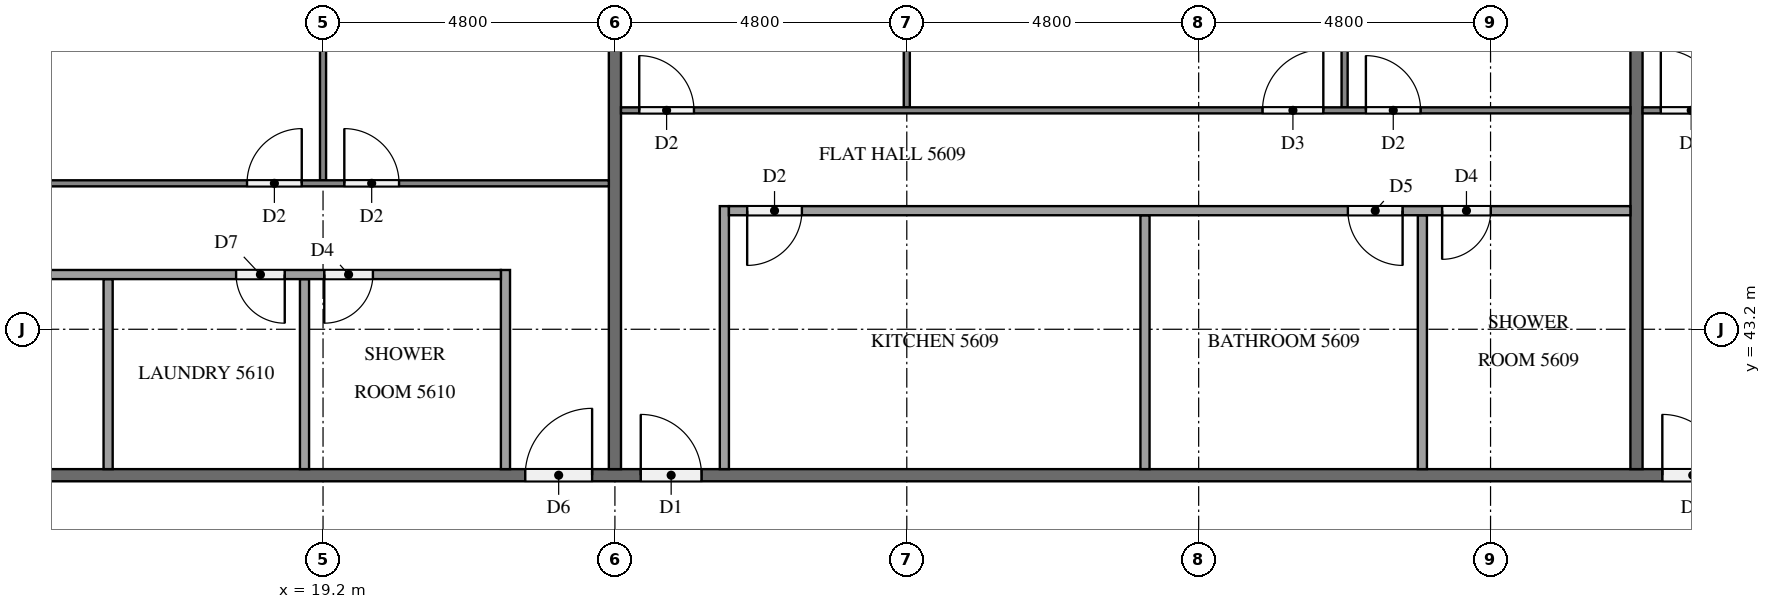
"""IFC4 building model, lengths in metres.
Left out: names, types, materials, properties, quantities, classifications, styles, units other than length and angle.
Written with IfcOpenShell. Run it as: python <this file> out.ifc"""

import sys

from ifc_helpers import new_model, si_unit, direction, frame, frame_2d, origin, place, context, subcontext, project, spatial, rectangle, extrude, element, fill, save


model = new_model("IFC4")
c1 = context("Model", 3, precision=1e-05, world=origin(), true_north=direction((0.0, 1.0)))
c2 = subcontext(c1, "Body", "Model", "MODEL_VIEW")
j1 = project(units=[si_unit("LENGTHUNIT", "METRE"), si_unit("PLANEANGLEUNIT", "RADIAN")], contexts=[c1])
p1 = place(None, origin())
s1 = spatial("IfcSite", under=j1, at=p1, CompositionType="ELEMENT")
p2 = place(p1, origin())
s2 = spatial("IfcBuilding", under=s1, at=p2, CompositionType="ELEMENT")
p3 = place(p2, frame((0.0, 0.0, 215.8)))
s3 = spatial("IfcBuildingStorey", under=s2, at=p3, CompositionType="ELEMENT", Elevation=215.8)
p4 = place(p3, frame((11.9, 40.8, 0.0), z_axis=(0.0, 0.0, 1.0), x_axis=(1.0, 0.0, 0.0)))
e1 = element("IfcWall", 1, at=p4, inside=s3, PredefinedType="PARTITIONING", context=c2, shape_type="SweptSolid", body=[
    extrude(rectangle(XDim=38.6, YDim=0.2, at=frame_2d((19.3, 0.0))), origin(), (0.0, 0.0, 1.0), 3.2),
])
p5 = place(p4, frame((36.525, 0.0, 0.0)))
e2 = element("IfcOpeningElement", 2, at=p5, cuts=e1, PredefinedType="OPENING", context=c2, shape_type="SweptSolid", body=[
    extrude(rectangle(XDim=1.0, YDim=2.1, at=frame_2d((0.5, 1.05))), frame((0.0, 0.11, 0.0), z_axis=(0.0, -1.0, 0.0), x_axis=(1.0, 0.0, 0.0)), (0.0, 0.0, 1.0), 0.22),
])
p6 = place(p4, frame((29.325, 0.0, 0.0)))
e3 = element("IfcOpeningElement", 3, at=p6, cuts=e1, PredefinedType="OPENING", context=c2, shape_type="SweptSolid", body=[
    extrude(rectangle(XDim=1.0, YDim=2.1, at=frame_2d((0.5, 1.05))), frame((0.0, 0.11, 0.0), z_axis=(0.0, -1.0, 0.0), x_axis=(1.0, 0.0, 0.0)), (0.0, 0.0, 1.0), 0.22),
])
p7 = place(p4, frame((12.525, 0.0, 0.0)))
e4 = element("IfcOpeningElement", 4, at=p7, cuts=e1, PredefinedType="OPENING", context=c2, shape_type="SweptSolid", body=[
    extrude(rectangle(XDim=1.0, YDim=2.1, at=frame_2d((0.5, 1.05))), frame((0.0, 0.11, 0.0), z_axis=(0.0, -1.0, 0.0), x_axis=(1.0, 0.0, 0.0)), (0.0, 0.0, 1.0), 0.22),
])
p8 = place(p4, frame((10.625, 0.0, 0.0)))
e5 = element("IfcOpeningElement", 5, at=p8, cuts=e1, PredefinedType="OPENING", context=c2, shape_type="SweptSolid", body=[
    extrude(rectangle(XDim=1.1, YDim=2.1, at=frame_2d((0.55, 1.05))), frame((0.0, 0.11, 0.0), z_axis=(0.0, -1.0, 0.0), x_axis=(1.0, 0.0, 0.0)), (0.0, 0.0, 1.0), 0.22),
])
for number, where, z_axis, x_axis in (
    (6, (40.8, 52.7, 0.0), (0.0, 0.0, 1.0), (0.0, -1.0, 0.0)),
    (7, (24.0, 52.7, 0.0), (0.0, 0.0, 1.0), (0.0, -1.0, 0.0)),
):
    element("IfcWall", number, at=place(p3, frame(where, z_axis=z_axis, x_axis=x_axis)), inside=s3, PredefinedType="PARTITIONING", context=c2, shape_type="SweptSolid", body=[
        extrude(rectangle(XDim=11.8, YDim=0.2, at=frame_2d((5.9, 0.0))), origin(), (0.0, 0.0, 1.0), 3.2),
    ])
p9 = place(p3, frame((40.9, 46.8, 0.0), z_axis=(0.0, 0.0, 1.0), x_axis=(1.0, 0.0, 0.0)))
e8 = element("IfcWall", 8, at=p9, inside=s3, PredefinedType="PARTITIONING", context=c2, shape_type="SweptSolid", body=[
    extrude(rectangle(XDim=7.0, YDim=0.1, at=frame_2d((3.5, 0.0))), origin(), (0.0, 0.0, 1.0), 3.2),
])
p10 = place(p9, frame((0.3, 0.0, 0.0)))
e9 = element("IfcOpeningElement", 9, at=p10, cuts=e8, PredefinedType="OPENING", context=c2, shape_type="SweptSolid", body=[
    extrude(rectangle(XDim=1.0, YDim=2.1, at=frame_2d((0.5, 1.05))), frame((0.0, 0.06, 0.0), z_axis=(0.0, -1.0, 0.0), x_axis=(1.0, 0.0, 0.0)), (0.0, 0.0, 1.0), 0.12),
])
p11 = place(p3, frame((28.8, 46.85, 0.0), z_axis=(0.0, 0.0, 1.0), x_axis=(0.0, 1.0, 0.0)))
e10 = element("IfcWall", 10, at=p11, inside=s3, PredefinedType="PARTITIONING", context=c2, shape_type="SweptSolid", body=[
    extrude(rectangle(XDim=5.625, YDim=0.1, at=frame_2d((2.812, 0.0))), origin(), (0.0, 0.0, 1.0), 3.2),
])
p12 = place(p3, frame((36.0, 46.85, 0.0), z_axis=(0.0, 0.0, 1.0), x_axis=(0.0, 1.0, 0.0)))
e11 = element("IfcWall", 11, at=p12, inside=s3, PredefinedType="PARTITIONING", context=c2, shape_type="SweptSolid", body=[
    extrude(rectangle(XDim=5.85, YDim=0.1, at=frame_2d((2.925, 0.0))), origin(), (0.0, 0.0, 1.0), 3.2),
])
p13 = place(p3, frame((24.1, 46.8, 0.0), z_axis=(0.0, 0.0, 1.0), x_axis=(1.0, 0.0, 0.0)))
e12 = element("IfcWall", 12, at=p13, inside=s3, PredefinedType="PARTITIONING", context=c2, shape_type="SweptSolid", body=[
    extrude(rectangle(XDim=16.6, YDim=0.1, at=frame_2d((8.3, 0.0))), origin(), (0.0, 0.0, 1.0), 3.2),
])
p14 = place(p13, frame((0.3, 0.0, 0.0)))
e13 = element("IfcOpeningElement", 13, at=p14, cuts=e12, PredefinedType="OPENING", context=c2, shape_type="SweptSolid", body=[
    extrude(rectangle(XDim=0.9, YDim=2.1, at=frame_2d((0.45, 1.05))), frame((0.0, 0.06, 0.0), z_axis=(0.0, -1.0, 0.0), x_axis=(1.0, 0.0, 0.0)), (0.0, 0.0, 1.0), 0.12),
])
p15 = place(p13, frame((10.55, 0.0, 0.0)))
e14 = element("IfcOpeningElement", 14, at=p15, cuts=e12, PredefinedType="OPENING", context=c2, shape_type="SweptSolid", body=[
    extrude(rectangle(XDim=1.0, YDim=2.1, at=frame_2d((0.5, 1.05))), frame((0.0, 0.06, 0.0), z_axis=(0.0, -1.0, 0.0), x_axis=(1.0, 0.0, 0.0)), (0.0, 0.0, 1.0), 0.12),
])
p16 = place(p13, frame((12.25, 0.0, 0.0)))
e15 = element("IfcOpeningElement", 15, at=p16, cuts=e12, PredefinedType="OPENING", context=c2, shape_type="SweptSolid", body=[
    extrude(rectangle(XDim=0.9, YDim=2.1, at=frame_2d((0.45, 1.05))), frame((0.0, 0.06, 0.0), z_axis=(0.0, -1.0, 0.0), x_axis=(1.0, 0.0, 0.0)), (0.0, 0.0, 1.0), 0.12),
])
for number, where, z_axis, x_axis in (
    (16, (32.717, 40.9, 0.0), (0.0, 0.0, 1.0), (0.0, 1.0, 0.0)),
    (17, (37.279, 40.9, 0.0), (0.0, 0.0, 1.0), (0.0, 1.0, 0.0)),
):
    element("IfcWall", number, at=place(p3, frame(where, z_axis=z_axis, x_axis=x_axis)), inside=s3, PredefinedType="PARTITIONING", context=c2, shape_type="SweptSolid", body=[
        extrude(rectangle(XDim=4.175, YDim=0.15, at=frame_2d((2.087, 0.0))), origin(), (0.0, 0.0, 1.0), 3.2),
    ])
p17 = place(p3, frame((25.8, 40.9, 0.0), z_axis=(0.0, 0.0, 1.0), x_axis=(0.0, 1.0, 0.0)))
e18 = element("IfcWall", 18, at=p17, inside=s3, PredefinedType="PARTITIONING", context=c2, shape_type="SweptSolid", body=[
    extrude(rectangle(XDim=4.325, YDim=0.15, at=frame_2d((2.163, 0.0))), origin(), (0.0, 0.0, 1.0), 3.2),
])
p18 = place(p3, frame((40.7, 45.15, 0.0), z_axis=(0.0, 0.0, 1.0), x_axis=(-1.0, 0.0, 0.0)))
e19 = element("IfcWall", 19, at=p18, inside=s3, PredefinedType="PARTITIONING", context=c2, shape_type="SweptSolid", body=[
    extrude(rectangle(XDim=14.825, YDim=0.15, at=frame_2d((7.413, 0.0))), origin(), (0.0, 0.0, 1.0), 3.2),
])
p19 = place(p18, frame((13.625, 0.0, 0.0)))
e20 = element("IfcOpeningElement", 20, at=p19, cuts=e19, PredefinedType="OPENING", context=c2, shape_type="SweptSolid", body=[
    extrude(rectangle(XDim=0.9, YDim=2.1, at=frame_2d((0.45, 1.05))), frame((0.0, 0.085, 0.0), z_axis=(0.0, -1.0, 0.0), x_axis=(1.0, 0.0, 0.0)), (0.0, 0.0, 1.0), 0.17),
])
p20 = place(p18, frame((3.746, 0.0, 0.0)))
e21 = element("IfcOpeningElement", 21, at=p20, cuts=e19, PredefinedType="OPENING", context=c2, shape_type="SweptSolid", body=[
    extrude(rectangle(XDim=0.9, YDim=2.1, at=frame_2d((0.45, 1.05))), frame((0.0, 0.085, 0.0), z_axis=(0.0, -1.0, 0.0), x_axis=(1.0, 0.0, 0.0)), (0.0, 0.0, 1.0), 0.17),
])
p21 = place(p18, frame((2.296, 0.0, 0.0)))
e22 = element("IfcOpeningElement", 22, at=p21, cuts=e19, PredefinedType="OPENING", context=c2, shape_type="SweptSolid", body=[
    extrude(rectangle(XDim=0.8, YDim=2.1, at=frame_2d((0.4, 1.05))), frame((0.0, 0.085, 0.0), z_axis=(0.0, -1.0, 0.0), x_axis=(1.0, 0.0, 0.0)), (0.0, 0.0, 1.0), 0.17),
])
p22 = place(p3, frame((19.2, 45.65, 0.0), z_axis=(0.0, 0.0, 1.0), x_axis=(0.0, 1.0, 0.0)))
e23 = element("IfcWall", 23, at=p22, inside=s3, PredefinedType="PARTITIONING", context=c2, shape_type="SweptSolid", body=[
    extrude(rectangle(XDim=6.825, YDim=0.1, at=frame_2d((3.413, 0.0))), origin(), (0.0, 0.0, 1.0), 3.2),
])
p23 = place(p3, frame((4.9, 45.6, 0.0), z_axis=(0.0, 0.0, 1.0), x_axis=(1.0, 0.0, 0.0)))
e24 = element("IfcWall", 24, at=p23, inside=s3, PredefinedType="PARTITIONING", context=c2, shape_type="SweptSolid", body=[
    extrude(rectangle(XDim=19.0, YDim=0.1, at=frame_2d((9.5, 0.0))), origin(), (0.0, 0.0, 1.0), 3.2),
])
p24 = place(p23, frame((14.65, 0.0, 0.0)))
e25 = element("IfcOpeningElement", 25, at=p24, cuts=e24, PredefinedType="OPENING", context=c2, shape_type="SweptSolid", body=[
    extrude(rectangle(XDim=0.9, YDim=2.1, at=frame_2d((0.45, 1.05))), frame((0.0, 0.06, 0.0), z_axis=(0.0, -1.0, 0.0), x_axis=(1.0, 0.0, 0.0)), (0.0, 0.0, 1.0), 0.12),
])
p25 = place(p23, frame((13.05, 0.0, 0.0)))
e26 = element("IfcOpeningElement", 26, at=p25, cuts=e24, PredefinedType="OPENING", context=c2, shape_type="SweptSolid", body=[
    extrude(rectangle(XDim=0.9, YDim=2.1, at=frame_2d((0.45, 1.05))), frame((0.0, 0.06, 0.0), z_axis=(0.0, -1.0, 0.0), x_axis=(1.0, 0.0, 0.0)), (0.0, 0.0, 1.0), 0.12),
])
p26 = place(p23, frame((5.05, 0.0, 0.0)))
e27 = element("IfcOpeningElement", 27, at=p26, cuts=e24, PredefinedType="OPENING", context=c2, shape_type="SweptSolid", body=[
    extrude(rectangle(XDim=0.9, YDim=2.1, at=frame_2d((0.45, 1.05))), frame((0.0, 0.06, 0.0), z_axis=(0.0, -1.0, 0.0), x_axis=(1.0, 0.0, 0.0)), (0.0, 0.0, 1.0), 0.12),
])
p27 = place(p23, frame((3.35, 0.0, 0.0)))
e28 = element("IfcOpeningElement", 28, at=p27, cuts=e24, PredefinedType="OPENING", context=c2, shape_type="SweptSolid", body=[
    extrude(rectangle(XDim=1.0, YDim=2.1, at=frame_2d((0.5, 1.05))), frame((0.0, 0.06, 0.0), z_axis=(0.0, -1.0, 0.0), x_axis=(1.0, 0.0, 0.0)), (0.0, 0.0, 1.0), 0.12),
])
for number, where, z_axis, x_axis in (
    (29, (18.895, 40.9, 0.0), (0.0, 0.0, 1.0), (0.0, 1.0, 0.0)),
    (30, (15.666, 40.9, 0.0), (0.0, 0.0, 1.0), (0.0, 1.0, 0.0)),
):
    element("IfcWall", number, at=place(p3, frame(where, z_axis=z_axis, x_axis=x_axis)), inside=s3, PredefinedType="PARTITIONING", context=c2, shape_type="SweptSolid", body=[
        extrude(rectangle(XDim=3.125, YDim=0.15, at=frame_2d((1.562, 0.0))), origin(), (0.0, 0.0, 1.0), 3.2),
    ])
p28 = place(p3, frame((22.2, 40.9, 0.0), z_axis=(0.0, 0.0, 1.0), x_axis=(0.0, 1.0, 0.0)))
e31 = element("IfcWall", 31, at=p28, inside=s3, PredefinedType="PARTITIONING", context=c2, shape_type="SweptSolid", body=[
    extrude(rectangle(XDim=3.275, YDim=0.15, at=frame_2d((1.638, 0.0))), origin(), (0.0, 0.0, 1.0), 3.2),
])
p29 = place(p3, frame((22.125, 44.1, 0.0), z_axis=(0.0, 0.0, 1.0), x_axis=(-1.0, 0.0, 0.0)))
e32 = element("IfcWall", 32, at=p29, inside=s3, PredefinedType="PARTITIONING", context=c2, shape_type="SweptSolid", body=[
    extrude(rectangle(XDim=17.225, YDim=0.15, at=frame_2d((8.613, 0.0))), origin(), (0.0, 0.0, 1.0), 3.2),
])
p30 = place(p29, frame((2.105, 0.0, 0.0)))
e33 = element("IfcOpeningElement", 33, at=p30, cuts=e32, PredefinedType="OPENING", context=c2, shape_type="SweptSolid", body=[
    extrude(rectangle(XDim=0.8, YDim=2.1, at=frame_2d((0.4, 1.05))), frame((0.0, 0.085, 0.0), z_axis=(0.0, -1.0, 0.0), x_axis=(1.0, 0.0, 0.0)), (0.0, 0.0, 1.0), 0.17),
])
p31 = place(p29, frame((3.555, 0.0, 0.0)))
e34 = element("IfcOpeningElement", 34, at=p31, cuts=e32, PredefinedType="OPENING", context=c2, shape_type="SweptSolid", body=[
    extrude(rectangle(XDim=0.8, YDim=2.1, at=frame_2d((0.4, 1.05))), frame((0.0, 0.085, 0.0), z_axis=(0.0, -1.0, 0.0), x_axis=(1.0, 0.0, 0.0)), (0.0, 0.0, 1.0), 0.17),
])
p32 = place(p29, frame((11.694, 0.0, 0.0)))
e35 = element("IfcOpeningElement", 35, at=p32, cuts=e32, PredefinedType="OPENING", context=c2, shape_type="SweptSolid", body=[
    extrude(rectangle(XDim=0.9, YDim=2.1, at=frame_2d((0.45, 1.05))), frame((0.0, 0.085, 0.0), z_axis=(0.0, -1.0, 0.0), x_axis=(1.0, 0.0, 0.0)), (0.0, 0.0, 1.0), 0.17),
])
p33 = place(p29, frame((13.244, 0.0, 0.0)))
e36 = element("IfcOpeningElement", 36, at=p33, cuts=e32, PredefinedType="OPENING", context=c2, shape_type="SweptSolid", body=[
    extrude(rectangle(XDim=0.9, YDim=2.1, at=frame_2d((0.45, 1.05))), frame((0.0, 0.085, 0.0), z_axis=(0.0, -1.0, 0.0), x_axis=(1.0, 0.0, 0.0)), (0.0, 0.0, 1.0), 0.17),
])
p34 = place(p6, origin())
e37 = element("IfcDoor", 37, at=p34, inside=s3, OperationType="SINGLE_SWING_LEFT", PredefinedType="DOOR", context=c2, shape_type="SweptSolid", body=[
    extrude(rectangle(XDim=1.0, YDim=2.1, at=frame_2d((0.5, 1.05))), frame((0.0, 0.025, 0.0), z_axis=(0.0, -1.0, 0.0), x_axis=(1.0, 0.0, 0.0)), (0.0, 0.0, 1.0), 0.05),
])
fill(e3, e37)
p35 = place(p7, origin())
e38 = element("IfcDoor", 38, at=p35, inside=s3, OperationType="SINGLE_SWING_LEFT", PredefinedType="DOOR", context=c2, shape_type="SweptSolid", body=[
    extrude(rectangle(XDim=1.0, YDim=2.1, at=frame_2d((0.5, 1.05))), frame((0.0, 0.025, 0.0), z_axis=(0.0, -1.0, 0.0), x_axis=(1.0, 0.0, 0.0)), (0.0, 0.0, 1.0), 0.05),
])
fill(e4, e38)
p36 = place(p8, origin())
e39 = element("IfcDoor", 39, at=p36, inside=s3, OperationType="SINGLE_SWING_RIGHT", PredefinedType="DOOR", context=c2, shape_type="SweptSolid", body=[
    extrude(rectangle(XDim=1.1, YDim=2.1, at=frame_2d((0.55, 1.05))), frame((0.0, 0.025, 0.0), z_axis=(0.0, -1.0, 0.0), x_axis=(1.0, 0.0, 0.0)), (0.0, 0.0, 1.0), 0.05),
])
fill(e5, e39)
p37 = place(p10, origin())
e40 = element("IfcDoor", 40, at=p37, inside=s3, OperationType="SINGLE_SWING_LEFT", PredefinedType="DOOR", context=c2, shape_type="SweptSolid", body=[
    extrude(rectangle(XDim=1.0, YDim=2.1, at=frame_2d((0.5, 1.05))), frame((0.0, 0.025, 0.0), z_axis=(0.0, -1.0, 0.0), x_axis=(1.0, 0.0, 0.0)), (0.0, 0.0, 1.0), 0.05),
])
fill(e9, e40)
p38 = place(p14, origin())
e41 = element("IfcDoor", 41, at=p38, inside=s3, OperationType="SINGLE_SWING_LEFT", PredefinedType="DOOR", context=c2, shape_type="SweptSolid", body=[
    extrude(rectangle(XDim=0.9, YDim=2.1, at=frame_2d((0.45, 1.05))), frame((0.0, 0.025, 0.0), z_axis=(0.0, -1.0, 0.0), x_axis=(1.0, 0.0, 0.0)), (0.0, 0.0, 1.0), 0.05),
])
fill(e13, e41)
p39 = place(p15, origin())
e42 = element("IfcDoor", 42, at=p39, inside=s3, OperationType="SINGLE_SWING_RIGHT", PredefinedType="DOOR", context=c2, shape_type="SweptSolid", body=[
    extrude(rectangle(XDim=1.0, YDim=2.1, at=frame_2d((0.5, 1.05))), frame((0.0, 0.025, 0.0), z_axis=(0.0, -1.0, 0.0), x_axis=(1.0, 0.0, 0.0)), (0.0, 0.0, 1.0), 0.05),
])
fill(e14, e42)
p40 = place(p16, origin())
e43 = element("IfcDoor", 43, at=p40, inside=s3, OperationType="SINGLE_SWING_LEFT", PredefinedType="DOOR", context=c2, shape_type="SweptSolid", body=[
    extrude(rectangle(XDim=0.9, YDim=2.1, at=frame_2d((0.45, 1.05))), frame((0.0, 0.025, 0.0), z_axis=(0.0, -1.0, 0.0), x_axis=(1.0, 0.0, 0.0)), (0.0, 0.0, 1.0), 0.05),
])
fill(e15, e43)
p41 = place(p19, origin())
e44 = element("IfcDoor", 44, at=p41, inside=s3, OperationType="SINGLE_SWING_RIGHT", PredefinedType="DOOR", context=c2, shape_type="SweptSolid", body=[
    extrude(rectangle(XDim=0.9, YDim=2.1, at=frame_2d((0.45, 1.05))), frame((0.0, 0.025, 0.0), z_axis=(0.0, -1.0, 0.0), x_axis=(1.0, 0.0, 0.0)), (0.0, 0.0, 1.0), 0.05),
])
fill(e20, e44)
p42 = place(p20, origin())
e45 = element("IfcDoor", 45, at=p42, inside=s3, OperationType="SINGLE_SWING_LEFT", PredefinedType="DOOR", context=c2, shape_type="SweptSolid", body=[
    extrude(rectangle(XDim=0.9, YDim=2.1, at=frame_2d((0.45, 1.05))), frame((0.0, 0.025, 0.0), z_axis=(0.0, -1.0, 0.0), x_axis=(1.0, 0.0, 0.0)), (0.0, 0.0, 1.0), 0.05),
])
fill(e21, e45)
p43 = place(p21, origin())
e46 = element("IfcDoor", 46, at=p43, inside=s3, OperationType="SINGLE_SWING_RIGHT", PredefinedType="DOOR", context=c2, shape_type="SweptSolid", body=[
    extrude(rectangle(XDim=0.8, YDim=2.1, at=frame_2d((0.4, 1.05))), frame((0.0, 0.025, 0.0), z_axis=(0.0, -1.0, 0.0), x_axis=(1.0, 0.0, 0.0)), (0.0, 0.0, 1.0), 0.05),
])
fill(e22, e46)
p44 = place(p24, origin())
e47 = element("IfcDoor", 47, at=p44, inside=s3, OperationType="SINGLE_SWING_LEFT", PredefinedType="DOOR", context=c2, shape_type="SweptSolid", body=[
    extrude(rectangle(XDim=0.9, YDim=2.1, at=frame_2d((0.45, 1.05))), frame((0.0, 0.025, 0.0), z_axis=(0.0, -1.0, 0.0), x_axis=(1.0, 0.0, 0.0)), (0.0, 0.0, 1.0), 0.05),
])
fill(e25, e47)
p45 = place(p25, origin())
e48 = element("IfcDoor", 48, at=p45, inside=s3, OperationType="SINGLE_SWING_RIGHT", PredefinedType="DOOR", context=c2, shape_type="SweptSolid", body=[
    extrude(rectangle(XDim=0.9, YDim=2.1, at=frame_2d((0.45, 1.05))), frame((0.0, 0.025, 0.0), z_axis=(0.0, -1.0, 0.0), x_axis=(1.0, 0.0, 0.0)), (0.0, 0.0, 1.0), 0.05),
])
fill(e26, e48)
p46 = place(p30, origin())
e49 = element("IfcDoor", 49, at=p46, inside=s3, OperationType="SINGLE_SWING_RIGHT", PredefinedType="DOOR", context=c2, shape_type="SweptSolid", body=[
    extrude(rectangle(XDim=0.8, YDim=2.1, at=frame_2d((0.4, 1.05))), frame((0.0, 0.025, 0.0), z_axis=(0.0, -1.0, 0.0), x_axis=(1.0, 0.0, 0.0)), (0.0, 0.0, 1.0), 0.05),
])
fill(e33, e49)
p47 = place(p31, origin())
e50 = element("IfcDoor", 50, at=p47, inside=s3, OperationType="SINGLE_SWING_LEFT", PredefinedType="DOOR", context=c2, shape_type="SweptSolid", body=[
    extrude(rectangle(XDim=0.8, YDim=2.1, at=frame_2d((0.4, 1.05))), frame((0.0, 0.025, 0.0), z_axis=(0.0, -1.0, 0.0), x_axis=(1.0, 0.0, 0.0)), (0.0, 0.0, 1.0), 0.05),
])
fill(e34, e50)
save(model, sys.argv[1])
